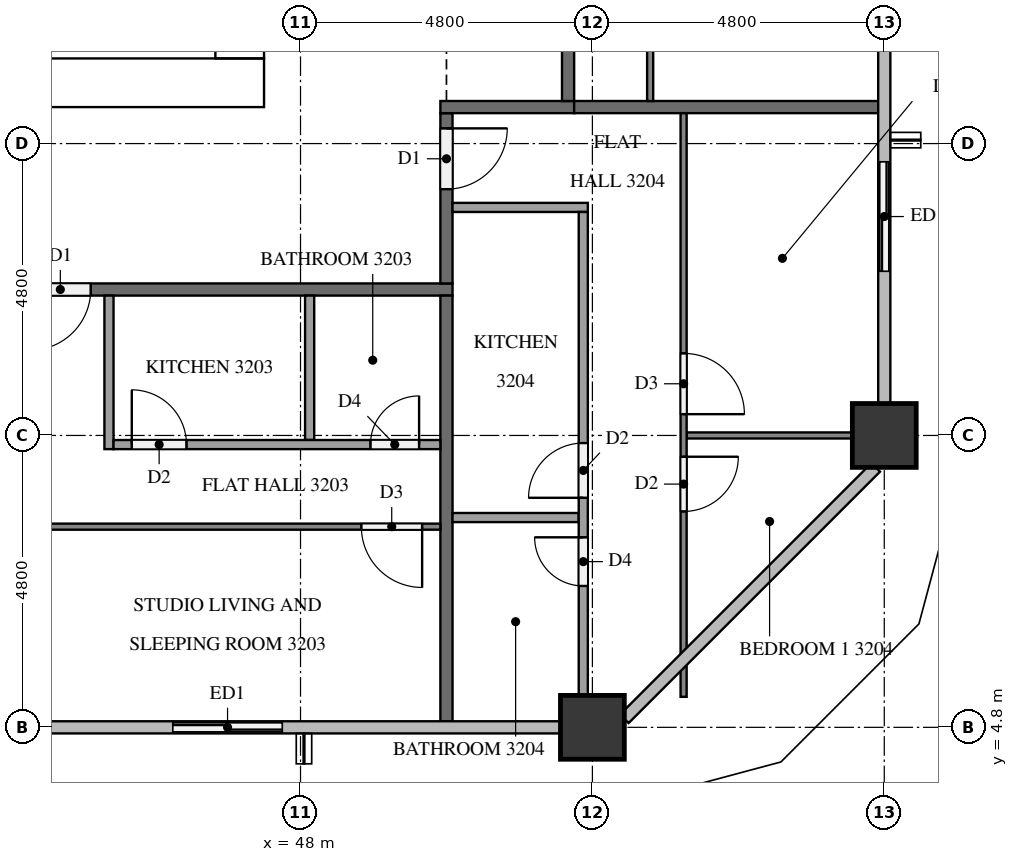
"""IFC4 building model, lengths in metres.
Left out: names, types, materials, properties, quantities, classifications, styles, units other than length and angle.
Written with IfcOpenShell. Run it as: python <this file> out.ifc"""

import sys

from ifc_helpers import new_model, si_unit, direction, frame, frame_2d, origin, origin_2d, place, context, subcontext, project, spatial, rectangle, extrude, element, fill, save


model = new_model("IFC4")
c1 = context("Model", 3, precision=1e-05, world=origin(), true_north=direction((0.0, 1.0)))
c2 = subcontext(c1, "Body", "Model", "MODEL_VIEW")
j1 = project(units=[si_unit("LENGTHUNIT", "METRE"), si_unit("PLANEANGLEUNIT", "RADIAN")], contexts=[c1])
p1 = place(None, origin())
s1 = spatial("IfcSite", under=j1, at=p1, CompositionType="ELEMENT")
p2 = place(p1, origin())
s2 = spatial("IfcBuilding", under=s1, at=p2, CompositionType="ELEMENT")
p3 = place(p2, frame((0.0, 0.0, 126.1)))
s3 = spatial("IfcBuildingStorey", under=s2, at=p3, CompositionType="ELEMENT", Elevation=126.1)
p4 = place(p3, frame((15.0, 15.4, 0.0), z_axis=(0.0, 0.0, 1.0), x_axis=(1.0, 0.0, 0.0)))
e1 = element("IfcWall", 1, at=p4, inside=s3, PredefinedType="SHEAR", context=c2, shape_type="SweptSolid", body=[
    extrude(rectangle(XDim=32.4, YDim=0.8, at=frame_2d((16.2, 0.0))), origin(), (0.0, 0.0, 1.0), 3.2),
])
p5 = place(p4, frame((15.3, 0.0, 0.0)))
e2 = element("IfcOpeningElement", 2, at=p5, cuts=e1, PredefinedType="OPENING", context=c2, shape_type="SweptSolid", body=[
    extrude(rectangle(XDim=1.8, YDim=2.1, at=frame_2d((0.9, 1.05))), frame((0.0, 0.41, 0.0), z_axis=(0.0, -1.0, 0.0), x_axis=(1.0, 0.0, 0.0)), (0.0, 0.0, 1.0), 0.82),
])
p6 = place(p3, frame((47.0, 15.8, 0.0), z_axis=(0.0, 0.0, 1.0), x_axis=(0.0, 1.0, 0.0)))
e3 = element("IfcWall", 3, at=p6, inside=s3, PredefinedType="SHEAR", context=c2, shape_type="SweptSolid", body=[
    extrude(rectangle(XDim=21.2, YDim=0.8, at=frame_2d((10.6, 0.0))), origin(), (0.0, 0.0, 1.0), 3.2),
])
p7 = place(p6, frame((10.3, 0.0, 0.0)))
e4 = element("IfcOpeningElement", 4, at=p7, cuts=e3, PredefinedType="OPENING", context=c2, shape_type="SweptSolid", body=[
    extrude(rectangle(XDim=1.2, YDim=2.1, at=frame_2d((0.6, 1.05))), frame((0.0, 0.41, 0.0), z_axis=(0.0, -1.0, 0.0), x_axis=(1.0, 0.0, 0.0)), (0.0, 0.0, 1.0), 0.82),
])
for number, where, z_axis, x_axis in (
    (5, (52.8, 4.8, 0.0), (0.0, 0.0, 1.0), (1.0, 0.0, 0.0)),
    (6, (57.6, 9.6, 0.0), (0.0, 0.0, 1.0), (1.0, 0.0, 0.0)),
):
    element("IfcColumn", number, at=place(p3, frame(where, z_axis=z_axis, x_axis=x_axis)), inside=s3, PredefinedType="COLUMN", context=c2, shape_type="SweptSolid", body=[
        extrude(rectangle(XDim=1.05, YDim=1.05, at=origin_2d()), origin(), (0.0, 0.0, 1.0), 3.2),
    ])
p8 = place(p3, frame((45.6, 4.8, 0.0), z_axis=(0.0, 0.0, 1.0), x_axis=(1.0, 0.0, 0.0)))
e7 = element("IfcWall", 7, at=p8, inside=s3, PredefinedType="SOLIDWALL", context=c2, shape_type="SweptSolid", body=[
    extrude(rectangle(XDim=2.4, YDim=0.15, at=frame_2d((1.2, 0.0))), origin(), (0.0, 0.0, 1.0), 3.2),
])
p9 = place(p8, frame((0.3, 0.0, 0.0)))
e8 = element("IfcOpeningElement", 8, at=p9, cuts=e7, PredefinedType="OPENING", context=c2, shape_type="SweptSolid", body=[
    extrude(rectangle(XDim=1.8, YDim=2.4, at=frame_2d((0.9, 1.2))), frame((0.0, 0.085, 0.0), z_axis=(0.0, -1.0, 0.0), x_axis=(1.0, 0.0, 0.0)), (0.0, 0.0, 1.0), 0.17),
])
p10 = place(p3, frame((57.6, 12.0, 0.0), z_axis=(0.0, 0.0, 1.0), x_axis=(0.0, 1.0, 0.0)))
e9 = element("IfcWall", 9, at=p10, inside=s3, PredefinedType="SOLIDWALL", context=c2, shape_type="SweptSolid", body=[
    extrude(rectangle(XDim=2.4, YDim=0.15, at=frame_2d((1.2, 0.0))), origin(), (0.0, 0.0, 1.0), 3.2),
])
p11 = place(p10, frame((0.3, 0.0, 0.0)))
e10 = element("IfcOpeningElement", 10, at=p11, cuts=e9, PredefinedType="OPENING", context=c2, shape_type="SweptSolid", body=[
    extrude(rectangle(XDim=1.8, YDim=2.4, at=frame_2d((0.9, 1.2))), frame((0.0, 0.085, 0.0), z_axis=(0.0, -1.0, 0.0), x_axis=(1.0, 0.0, 0.0)), (0.0, 0.0, 1.0), 0.17),
])
p12 = place(p3, frame((50.5, 12.0, 0.0), z_axis=(0.0, 0.0, 1.0), x_axis=(-1.0, 0.0, 0.0)))
e11 = element("IfcWall", 11, at=p12, inside=s3, PredefinedType="PARTITIONING", context=c2, shape_type="SweptSolid", body=[
    extrude(rectangle(XDim=38.6, YDim=0.2, at=frame_2d((19.3, 0.0))), origin(), (0.0, 0.0, 1.0), 3.2),
])
p13 = place(p12, frame((37.15, 0.0, 0.0)))
e12 = element("IfcOpeningElement", 12, at=p13, cuts=e11, PredefinedType="OPENING", context=c2, shape_type="SweptSolid", body=[
    extrude(rectangle(XDim=1.0, YDim=2.1, at=frame_2d((0.5, 1.05))), frame((0.0, 0.11, 0.0), z_axis=(0.0, -1.0, 0.0), x_axis=(1.0, 0.0, 0.0)), (0.0, 0.0, 1.0), 0.22),
])
p14 = place(p12, frame((7.65, 0.0, 0.0)))
e13 = element("IfcOpeningElement", 13, at=p14, cuts=e11, PredefinedType="OPENING", context=c2, shape_type="SweptSolid", body=[
    extrude(rectangle(XDim=1.0, YDim=2.1, at=frame_2d((0.5, 1.05))), frame((0.0, 0.11, 0.0), z_axis=(0.0, -1.0, 0.0), x_axis=(1.0, 0.0, 0.0)), (0.0, 0.0, 1.0), 0.22),
])
p15 = place(p12, frame((5.95, 0.0, 0.0)))
e14 = element("IfcOpeningElement", 14, at=p15, cuts=e11, PredefinedType="OPENING", context=c2, shape_type="SweptSolid", body=[
    extrude(rectangle(XDim=1.0, YDim=2.1, at=frame_2d((0.5, 1.05))), frame((0.0, 0.11, 0.0), z_axis=(0.0, -1.0, 0.0), x_axis=(1.0, 0.0, 0.0)), (0.0, 0.0, 1.0), 0.22),
])
p16 = place(p3, frame((50.4, 14.9, 0.0), z_axis=(0.0, 0.0, 1.0), x_axis=(0.0, -1.0, 0.0)))
e15 = element("IfcWall", 15, at=p16, inside=s3, PredefinedType="PARTITIONING", context=c2, shape_type="SweptSolid", body=[
    extrude(rectangle(XDim=2.8, YDim=0.2, at=frame_2d((1.4, 0.0))), origin(), (0.0, 0.0, 1.0), 3.2),
])
p17 = place(p16, frame((0.25, 0.0, 0.0)))
e16 = element("IfcOpeningElement", 16, at=p17, cuts=e15, PredefinedType="OPENING", context=c2, shape_type="SweptSolid", body=[
    extrude(rectangle(XDim=1.0, YDim=2.1, at=frame_2d((0.5, 1.05))), frame((0.0, 0.11, 0.0), z_axis=(0.0, -1.0, 0.0), x_axis=(1.0, 0.0, 0.0)), (0.0, 0.0, 1.0), 0.22),
])
p18 = place(p3, frame((50.3, 15.0, 0.0), z_axis=(0.0, 0.0, 1.0), x_axis=(1.0, 0.0, 0.0)))
e17 = element("IfcWall", 17, at=p18, inside=s3, PredefinedType="PARTITIONING", context=c2, shape_type="SweptSolid", body=[
    extrude(rectangle(XDim=2.2, YDim=0.2, at=frame_2d((1.1, 0.0))), origin(), (0.0, 0.0, 1.0), 3.2),
])
p19 = place(p3, frame((52.4, 37.7, 0.0), z_axis=(0.0, 0.0, 1.0), x_axis=(0.0, -1.0, 0.0)))
e18 = element("IfcWall", 18, at=p19, inside=s3, PredefinedType="PARTITIONING", context=c2, shape_type="SweptSolid", body=[
    extrude(rectangle(XDim=22.6, YDim=0.2, at=frame_2d((11.3, 0.0))), origin(), (0.0, 0.0, 1.0), 3.2),
])
p20 = place(p19, frame((0.25, 0.0, 0.0)))
e19 = element("IfcOpeningElement", 19, at=p20, cuts=e18, PredefinedType="OPENING", context=c2, shape_type="SweptSolid", body=[
    extrude(rectangle(XDim=1.0, YDim=2.1, at=frame_2d((0.5, 1.05))), frame((0.0, 0.11, 0.0), z_axis=(0.0, -1.0, 0.0), x_axis=(1.0, 0.0, 0.0)), (0.0, 0.0, 1.0), 0.22),
])
p21 = place(p3, frame((50.4, 11.9, 0.0), z_axis=(0.0, 0.0, 1.0), x_axis=(0.0, -1.0, 0.0)))
e20 = element("IfcWall", 20, at=p21, inside=s3, PredefinedType="PARTITIONING", context=c2, shape_type="SweptSolid", body=[
    extrude(rectangle(XDim=7.0, YDim=0.2, at=frame_2d((3.5, 0.0))), origin(), (0.0, 0.0, 1.0), 3.2),
])
p22 = place(p3, frame((52.5, 15.0, 0.0), z_axis=(0.0, 0.0, 1.0), x_axis=(1.0, 0.0, 0.0)))
e21 = element("IfcWall", 21, at=p22, inside=s3, PredefinedType="PARTITIONING", context=c2, shape_type="SweptSolid", body=[
    extrude(rectangle(XDim=5.0, YDim=0.2, at=frame_2d((2.5, 0.0))), origin(), (0.0, 0.0, 1.0), 3.2),
])
p23 = place(p3, frame((50.3, 8.1, 0.0), z_axis=(0.0, 0.0, 1.0), x_axis=(-1.0, 0.0, 0.0)))
e22 = element("IfcWall", 22, at=p23, inside=s3, PredefinedType="PARTITIONING", context=c2, shape_type="SweptSolid", body=[
    extrude(rectangle(XDim=7.0, YDim=0.1, at=frame_2d((3.5, 0.0))), origin(), (0.0, 0.0, 1.0), 3.2),
])
p24 = place(p23, frame((0.3, 0.0, 0.0)))
e23 = element("IfcOpeningElement", 23, at=p24, cuts=e22, PredefinedType="OPENING", context=c2, shape_type="SweptSolid", body=[
    extrude(rectangle(XDim=1.0, YDim=2.1, at=frame_2d((0.5, 1.05))), frame((0.0, 0.06, 0.0), z_axis=(0.0, -1.0, 0.0), x_axis=(1.0, 0.0, 0.0)), (0.0, 0.0, 1.0), 0.12),
])
p25 = place(p3, frame((48.15, 11.9, 0.0), z_axis=(0.0, 0.0, 1.0), x_axis=(0.0, -1.0, 0.0)))
e24 = element("IfcWall", 24, at=p25, inside=s3, PredefinedType="PARTITIONING", context=c2, shape_type="SweptSolid", body=[
    extrude(rectangle(XDim=2.375, YDim=0.15, at=frame_2d((1.188, 0.0))), origin(), (0.0, 0.0, 1.0), 3.2),
])
p26 = place(p3, frame((44.85, 11.9, 0.0), z_axis=(0.0, 0.0, 1.0), x_axis=(0.0, -1.0, 0.0)))
e25 = element("IfcWall", 25, at=p26, inside=s3, PredefinedType="PARTITIONING", context=c2, shape_type="SweptSolid", body=[
    extrude(rectangle(XDim=2.525, YDim=0.15, at=frame_2d((1.262, 0.0))), origin(), (0.0, 0.0, 1.0), 3.2),
])
p27 = place(p3, frame((44.925, 9.45, 0.0), z_axis=(0.0, 0.0, 1.0), x_axis=(1.0, 0.0, 0.0)))
e26 = element("IfcWall", 26, at=p27, inside=s3, PredefinedType="PARTITIONING", context=c2, shape_type="SweptSolid", body=[
    extrude(rectangle(XDim=5.375, YDim=0.15, at=frame_2d((2.688, 0.0))), origin(), (0.0, 0.0, 1.0), 3.2),
])
p28 = place(p27, frame((0.3, 0.0, 0.0)))
e27 = element("IfcOpeningElement", 27, at=p28, cuts=e26, PredefinedType="OPENING", context=c2, shape_type="SweptSolid", body=[
    extrude(rectangle(XDim=0.9, YDim=2.1, at=frame_2d((0.45, 1.05))), frame((0.0, 0.085, 0.0), z_axis=(0.0, -1.0, 0.0), x_axis=(1.0, 0.0, 0.0)), (0.0, 0.0, 1.0), 0.17),
])
p29 = place(p27, frame((4.225, 0.0, 0.0)))
e28 = element("IfcOpeningElement", 28, at=p29, cuts=e26, PredefinedType="OPENING", context=c2, shape_type="SweptSolid", body=[
    extrude(rectangle(XDim=0.8, YDim=2.1, at=frame_2d((0.4, 1.05))), frame((0.0, 0.085, 0.0), z_axis=(0.0, -1.0, 0.0), x_axis=(1.0, 0.0, 0.0)), (0.0, 0.0, 1.0), 0.17),
])
p30 = place(p3, frame((54.35, 9.6, 0.0), z_axis=(0.0, 0.0, 1.0), x_axis=(1.0, 0.0, 0.0)))
e29 = element("IfcWall", 29, at=p30, inside=s3, PredefinedType="PARTITIONING", context=c2, shape_type="SweptSolid", body=[
    extrude(rectangle(XDim=2.725, YDim=0.1, at=frame_2d((1.362, 0.0))), origin(), (0.0, 0.0, 1.0), 3.2),
])
p31 = place(p3, frame((54.3, 14.9, 0.0), z_axis=(0.0, 0.0, 1.0), x_axis=(0.0, -1.0, 0.0)))
e30 = element("IfcWall", 30, at=p31, inside=s3, PredefinedType="PARTITIONING", context=c2, shape_type="SweptSolid", body=[
    extrude(rectangle(XDim=9.598, YDim=0.1, at=frame_2d((4.799, 0.0))), origin(), (0.0, 0.0, 1.0), 3.2),
])
p32 = place(p31, frame((3.95, 0.0, 0.0)))
e31 = element("IfcOpeningElement", 31, at=p32, cuts=e30, PredefinedType="OPENING", context=c2, shape_type="SweptSolid", body=[
    extrude(rectangle(XDim=1.0, YDim=2.1, at=frame_2d((0.5, 1.05))), frame((0.0, 0.06, 0.0), z_axis=(0.0, -1.0, 0.0), x_axis=(1.0, 0.0, 0.0)), (0.0, 0.0, 1.0), 0.12),
])
p33 = place(p31, frame((5.65, 0.0, 0.0)))
e32 = element("IfcOpeningElement", 32, at=p33, cuts=e30, PredefinedType="OPENING", context=c2, shape_type="SweptSolid", body=[
    extrude(rectangle(XDim=0.9, YDim=2.1, at=frame_2d((0.45, 1.05))), frame((0.0, 0.06, 0.0), z_axis=(0.0, -1.0, 0.0), x_axis=(1.0, 0.0, 0.0)), (0.0, 0.0, 1.0), 0.12),
])
p34 = place(p3, frame((50.5, 8.25, 0.0), z_axis=(0.0, 0.0, 1.0), x_axis=(1.0, 0.0, 0.0)))
e33 = element("IfcWall", 33, at=p34, inside=s3, PredefinedType="PARTITIONING", context=c2, shape_type="SweptSolid", body=[
    extrude(rectangle(XDim=2.075, YDim=0.15, at=frame_2d((1.038, 0.0))), origin(), (0.0, 0.0, 1.0), 3.2),
])
p35 = place(p3, frame((50.5, 13.35, 0.0), z_axis=(0.0, 0.0, 1.0), x_axis=(1.0, 0.0, 0.0)))
e34 = element("IfcWall", 34, at=p35, inside=s3, PredefinedType="PARTITIONING", context=c2, shape_type="SweptSolid", body=[
    extrude(rectangle(XDim=2.225, YDim=0.15, at=frame_2d((1.113, 0.0))), origin(), (0.0, 0.0, 1.0), 3.2),
])
p36 = place(p3, frame((52.65, 5.325, 0.0), z_axis=(0.0, 0.0, 1.0), x_axis=(0.0, 1.0, 0.0)))
e35 = element("IfcWall", 35, at=p36, inside=s3, PredefinedType="PARTITIONING", context=c2, shape_type="SweptSolid", body=[
    extrude(rectangle(XDim=7.95, YDim=0.15, at=frame_2d((3.975, 0.0))), origin(), (0.0, 0.0, 1.0), 3.2),
])
p37 = place(p36, frame((3.25, 0.0, 0.0)))
e36 = element("IfcOpeningElement", 36, at=p37, cuts=e35, PredefinedType="OPENING", context=c2, shape_type="SweptSolid", body=[
    extrude(rectangle(XDim=0.9, YDim=2.1, at=frame_2d((0.45, 1.05))), frame((0.0, 0.085, 0.0), z_axis=(0.0, -1.0, 0.0), x_axis=(1.0, 0.0, 0.0)), (0.0, 0.0, 1.0), 0.17),
])
p38 = place(p36, frame((1.8, 0.0, 0.0)))
e37 = element("IfcOpeningElement", 37, at=p38, cuts=e35, PredefinedType="OPENING", context=c2, shape_type="SweptSolid", body=[
    extrude(rectangle(XDim=0.8, YDim=2.1, at=frame_2d((0.4, 1.05))), frame((0.0, 0.085, 0.0), z_axis=(0.0, -1.0, 0.0), x_axis=(1.0, 0.0, 0.0)), (0.0, 0.0, 1.0), 0.17),
])
p39 = place(p3, frame((53.75, 37.7, 0.0), z_axis=(0.0, 0.0, 1.0), x_axis=(0.0, -1.0, 0.0)))
e38 = element("IfcWall", 38, at=p39, inside=s3, PredefinedType="PARTITIONING", context=c2, shape_type="SweptSolid", body=[
    extrude(rectangle(XDim=22.6, YDim=0.1, at=frame_2d((11.3, 0.0))), origin(), (0.0, 0.0, 1.0), 3.2),
])
p40 = place(p39, frame((2.85, 0.0, 0.0)))
e39 = element("IfcOpeningElement", 39, at=p40, cuts=e38, PredefinedType="OPENING", context=c2, shape_type="SweptSolid", body=[
    extrude(rectangle(XDim=0.9, YDim=2.1, at=frame_2d((0.45, 1.05))), frame((0.0, 0.06, 0.0), z_axis=(0.0, -1.0, 0.0), x_axis=(1.0, 0.0, 0.0)), (0.0, 0.0, 1.0), 0.12),
])
p41 = place(p39, frame((4.45, 0.0, 0.0)))
e40 = element("IfcOpeningElement", 40, at=p41, cuts=e38, PredefinedType="OPENING", context=c2, shape_type="SweptSolid", body=[
    extrude(rectangle(XDim=0.8, YDim=2.1, at=frame_2d((0.4, 1.05))), frame((0.0, 0.06, 0.0), z_axis=(0.0, -1.0, 0.0), x_axis=(1.0, 0.0, 0.0)), (0.0, 0.0, 1.0), 0.12),
])
p42 = place(p39, frame((7.65, 0.0, 0.0)))
e41 = element("IfcOpeningElement", 41, at=p42, cuts=e38, PredefinedType="OPENING", context=c2, shape_type="SweptSolid", body=[
    extrude(rectangle(XDim=0.9, YDim=2.1, at=frame_2d((0.45, 1.05))), frame((0.0, 0.06, 0.0), z_axis=(0.0, -1.0, 0.0), x_axis=(1.0, 0.0, 0.0)), (0.0, 0.0, 1.0), 0.12),
])
p43 = place(p39, frame((9.25, 0.0, 0.0)))
e42 = element("IfcOpeningElement", 42, at=p43, cuts=e38, PredefinedType="OPENING", context=c2, shape_type="SweptSolid", body=[
    extrude(rectangle(XDim=0.9, YDim=2.1, at=frame_2d((0.45, 1.05))), frame((0.0, 0.06, 0.0), z_axis=(0.0, -1.0, 0.0), x_axis=(1.0, 0.0, 0.0)), (0.0, 0.0, 1.0), 0.12),
])
p44 = place(p39, frame((17.15, 0.0, 0.0)))
e43 = element("IfcOpeningElement", 43, at=p44, cuts=e38, PredefinedType="OPENING", context=c2, shape_type="SweptSolid", body=[
    extrude(rectangle(XDim=1.0, YDim=2.1, at=frame_2d((0.5, 1.05))), frame((0.0, 0.06, 0.0), z_axis=(0.0, -1.0, 0.0), x_axis=(1.0, 0.0, 0.0)), (0.0, 0.0, 1.0), 0.12),
])
p45 = place(p39, frame((18.85, 0.0, 0.0)))
e44 = element("IfcOpeningElement", 44, at=p45, cuts=e38, PredefinedType="OPENING", context=c2, shape_type="SweptSolid", body=[
    extrude(rectangle(XDim=0.9, YDim=2.1, at=frame_2d((0.45, 1.05))), frame((0.0, 0.06, 0.0), z_axis=(0.0, -1.0, 0.0), x_axis=(1.0, 0.0, 0.0)), (0.0, 0.0, 1.0), 0.12),
])
p46 = place(p9, origin())
e45 = element("IfcDoor", 45, at=p46, inside=s3, OperationType="SLIDING_TO_RIGHT", PredefinedType="DOOR", context=c2, shape_type="SweptSolid", body=[
    extrude(rectangle(XDim=1.8, YDim=2.4, at=frame_2d((0.9, 1.2))), frame((0.0, 0.025, 0.0), z_axis=(0.0, -1.0, 0.0), x_axis=(1.0, 0.0, 0.0)), (0.0, 0.0, 1.0), 0.05),
])
fill(e8, e45)
p47 = place(p11, origin())
e46 = element("IfcDoor", 46, at=p47, inside=s3, OperationType="SLIDING_TO_LEFT", PredefinedType="DOOR", context=c2, shape_type="SweptSolid", body=[
    extrude(rectangle(XDim=1.8, YDim=2.4, at=frame_2d((0.9, 1.2))), frame((0.0, 0.025, 0.0), z_axis=(0.0, -1.0, 0.0), x_axis=(1.0, 0.0, 0.0)), (0.0, 0.0, 1.0), 0.05),
])
fill(e10, e46)
p48 = place(p15, origin())
e47 = element("IfcDoor", 47, at=p48, inside=s3, OperationType="SINGLE_SWING_RIGHT", PredefinedType="DOOR", context=c2, shape_type="SweptSolid", body=[
    extrude(rectangle(XDim=1.0, YDim=2.1, at=frame_2d((0.5, 1.05))), frame((0.0, 0.025, 0.0), z_axis=(0.0, -1.0, 0.0), x_axis=(1.0, 0.0, 0.0)), (0.0, 0.0, 1.0), 0.05),
])
fill(e14, e47)
p49 = place(p17, origin())
e48 = element("IfcDoor", 48, at=p49, inside=s3, OperationType="SINGLE_SWING_LEFT", PredefinedType="DOOR", context=c2, shape_type="SweptSolid", body=[
    extrude(rectangle(XDim=1.0, YDim=2.1, at=frame_2d((0.5, 1.05))), frame((0.0, 0.025, 0.0), z_axis=(0.0, -1.0, 0.0), x_axis=(1.0, 0.0, 0.0)), (0.0, 0.0, 1.0), 0.05),
])
fill(e16, e48)
p50 = place(p24, origin())
e49 = element("IfcDoor", 49, at=p50, inside=s3, OperationType="SINGLE_SWING_LEFT", PredefinedType="DOOR", context=c2, shape_type="SweptSolid", body=[
    extrude(rectangle(XDim=1.0, YDim=2.1, at=frame_2d((0.5, 1.05))), frame((0.0, 0.025, 0.0), z_axis=(0.0, -1.0, 0.0), x_axis=(1.0, 0.0, 0.0)), (0.0, 0.0, 1.0), 0.05),
])
fill(e23, e49)
p51 = place(p28, origin())
e50 = element("IfcDoor", 50, at=p51, inside=s3, OperationType="SINGLE_SWING_LEFT", PredefinedType="DOOR", context=c2, shape_type="SweptSolid", body=[
    extrude(rectangle(XDim=0.9, YDim=2.1, at=frame_2d((0.45, 1.05))), frame((0.0, 0.025, 0.0), z_axis=(0.0, -1.0, 0.0), x_axis=(1.0, 0.0, 0.0)), (0.0, 0.0, 1.0), 0.05),
])
fill(e27, e50)
p52 = place(p29, origin())
e51 = element("IfcDoor", 51, at=p52, inside=s3, OperationType="SINGLE_SWING_RIGHT", PredefinedType="DOOR", context=c2, shape_type="SweptSolid", body=[
    extrude(rectangle(XDim=0.8, YDim=2.1, at=frame_2d((0.4, 1.05))), frame((0.0, 0.025, 0.0), z_axis=(0.0, -1.0, 0.0), x_axis=(1.0, 0.0, 0.0)), (0.0, 0.0, 1.0), 0.05),
])
fill(e28, e51)
p53 = place(p32, origin())
e52 = element("IfcDoor", 52, at=p53, inside=s3, OperationType="SINGLE_SWING_RIGHT", PredefinedType="DOOR", context=c2, shape_type="SweptSolid", body=[
    extrude(rectangle(XDim=1.0, YDim=2.1, at=frame_2d((0.5, 1.05))), frame((0.0, 0.025, 0.0), z_axis=(0.0, -1.0, 0.0), x_axis=(1.0, 0.0, 0.0)), (0.0, 0.0, 1.0), 0.05),
])
fill(e31, e52)
p54 = place(p33, origin())
e53 = element("IfcDoor", 53, at=p54, inside=s3, OperationType="SINGLE_SWING_LEFT", PredefinedType="DOOR", context=c2, shape_type="SweptSolid", body=[
    extrude(rectangle(XDim=0.9, YDim=2.1, at=frame_2d((0.45, 1.05))), frame((0.0, 0.025, 0.0), z_axis=(0.0, -1.0, 0.0), x_axis=(1.0, 0.0, 0.0)), (0.0, 0.0, 1.0), 0.05),
])
fill(e32, e53)
p55 = place(p37, origin())
e54 = element("IfcDoor", 54, at=p55, inside=s3, OperationType="SINGLE_SWING_LEFT", PredefinedType="DOOR", context=c2, shape_type="SweptSolid", body=[
    extrude(rectangle(XDim=0.9, YDim=2.1, at=frame_2d((0.45, 1.05))), frame((0.0, 0.025, 0.0), z_axis=(0.0, -1.0, 0.0), x_axis=(1.0, 0.0, 0.0)), (0.0, 0.0, 1.0), 0.05),
])
fill(e36, e54)
p56 = place(p38, origin())
e55 = element("IfcDoor", 55, at=p56, inside=s3, OperationType="SINGLE_SWING_RIGHT", PredefinedType="DOOR", context=c2, shape_type="SweptSolid", body=[
    extrude(rectangle(XDim=0.8, YDim=2.1, at=frame_2d((0.4, 1.05))), frame((0.0, 0.025, 0.0), z_axis=(0.0, -1.0, 0.0), x_axis=(1.0, 0.0, 0.0)), (0.0, 0.0, 1.0), 0.05),
])
fill(e37, e55)
save(model, sys.argv[1])
